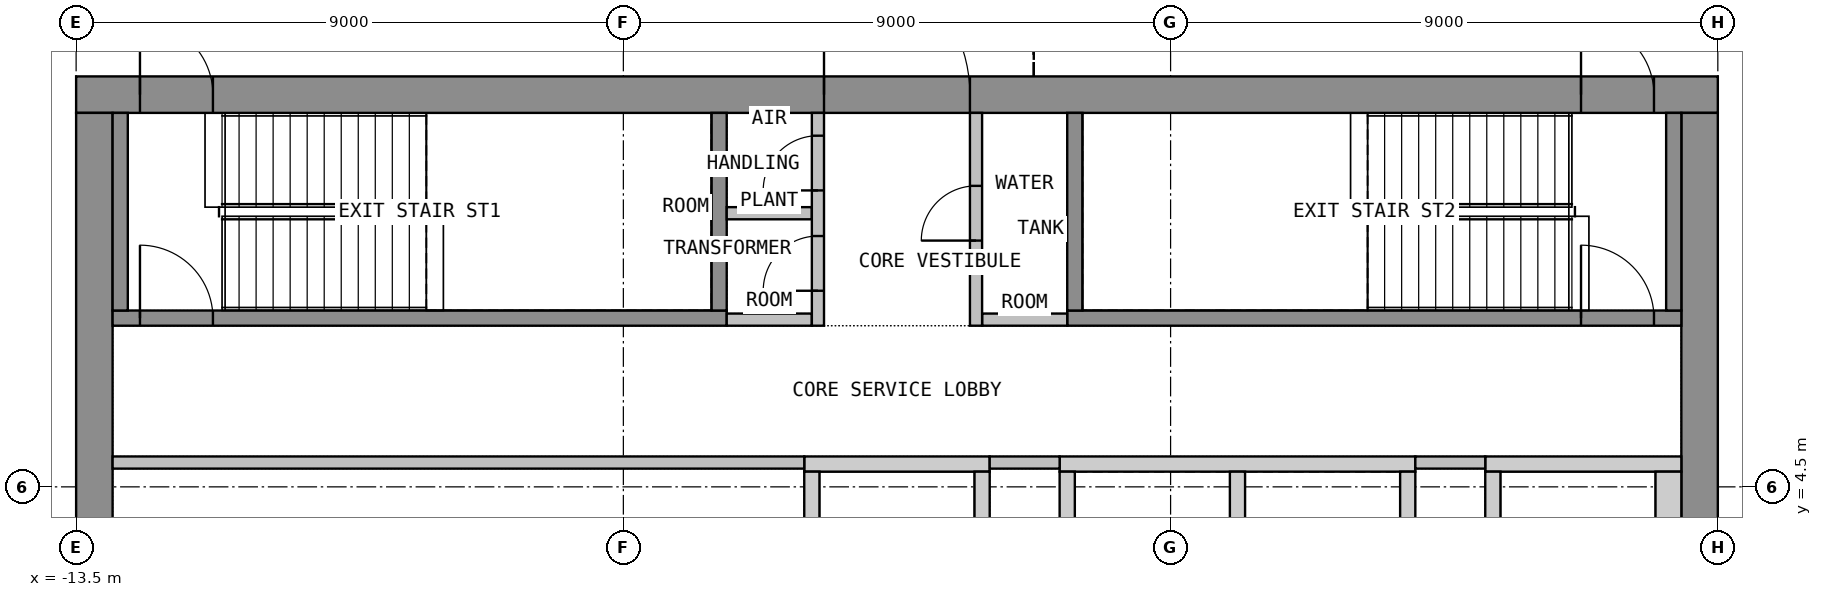
"""IFC4 building model, lengths in metres.
Left out: names, types, materials, properties, quantities, classifications, styles, units other than length and angle.
Written with IfcOpenShell. Run it as: python <this file> out.ifc"""

import sys

from ifc_helpers import new_model, si_unit, direction, frame, frame_2d, origin, place, context, subcontext, project, spatial, polyline, rectangle, outline, extrude, element, fill, save


model = new_model("IFC4")
c1 = context("Model", 3, precision=1e-05, world=origin(), true_north=direction((0.0, 1.0)))
c2 = subcontext(c1, "Body", "Model", "MODEL_VIEW")
j1 = project(units=[si_unit("LENGTHUNIT", "METRE"), si_unit("PLANEANGLEUNIT", "RADIAN")], contexts=[c1])
p1 = place(None, origin())
s1 = spatial("IfcSite", under=j1, at=p1, CompositionType="ELEMENT")
p2 = place(p1, origin())
s2 = spatial("IfcBuilding", under=s1, at=p2, CompositionType="ELEMENT")
p3 = place(p2, frame((0.0, 0.0, 230.7)))
s3 = spatial("IfcBuildingStorey", under=s2, at=p3, CompositionType="ELEMENT", Elevation=230.7)
p4 = place(p3, frame((-13.5, 10.95, 0.0), z_axis=(0.0, 0.0, 1.0), x_axis=(1.0, 0.0, 0.0)))
e1 = element("IfcWall", 1, at=p4, inside=s3, PredefinedType="SHEAR", context=c2, shape_type="SweptSolid", body=[
    extrude(rectangle(XDim=27.0, YDim=0.6, at=frame_2d((13.5, 0.0))), origin(), (0.0, 0.0, 1.0), 4.175),
])
p5 = place(p4, frame((12.3, 0.0, 0.0)))
e2 = element("IfcOpeningElement", 2, at=p5, cuts=e1, PredefinedType="OPENING", context=c2, shape_type="SweptSolid", body=[
    extrude(rectangle(XDim=2.4, YDim=2.1, at=frame_2d((1.2, 1.05))), frame((0.0, 0.31, 0.0), z_axis=(0.0, -1.0, 0.0), x_axis=(1.0, 0.0, 0.0)), (0.0, 0.0, 1.0), 0.62),
])
p6 = place(p4, frame((1.05, 0.0, 0.0)))
e3 = element("IfcOpeningElement", 3, at=p6, cuts=e1, PredefinedType="OPENING", context=c2, shape_type="SweptSolid", body=[
    extrude(rectangle(XDim=1.2, YDim=2.1, at=frame_2d((0.6, 1.05))), frame((0.0, 0.31, 0.0), z_axis=(0.0, -1.0, 0.0), x_axis=(1.0, 0.0, 0.0)), (0.0, 0.0, 1.0), 0.62),
])
p7 = place(p4, frame((24.75, 0.0, 0.0)))
e4 = element("IfcOpeningElement", 4, at=p7, cuts=e1, PredefinedType="OPENING", context=c2, shape_type="SweptSolid", body=[
    extrude(rectangle(XDim=1.2, YDim=2.1, at=frame_2d((0.6, 1.05))), frame((0.0, 0.31, 0.0), z_axis=(0.0, -1.0, 0.0), x_axis=(1.0, 0.0, 0.0)), (0.0, 0.0, 1.0), 0.62),
])
p8 = place(p3, frame((-13.2, -10.65, 0.0), z_axis=(0.0, 0.0, 1.0), x_axis=(0.0, 1.0, 0.0)))
e5 = element("IfcWall", 5, at=p8, inside=s3, PredefinedType="SHEAR", context=c2, shape_type="SweptSolid", body=[
    extrude(rectangle(XDim=21.3, YDim=0.6, at=frame_2d((10.65, 0.0))), origin(), (0.0, 0.0, 1.0), 4.175),
])
p9 = place(p8, frame((9.45, 0.0, 0.0)))
e6 = element("IfcOpeningElement", 6, at=p9, cuts=e5, PredefinedType="OPENING", context=c2, shape_type="SweptSolid", body=[
    extrude(rectangle(XDim=2.4, YDim=2.1, at=frame_2d((1.2, 1.05))), frame((0.0, 0.31, 0.0), z_axis=(0.0, -1.0, 0.0), x_axis=(1.0, 0.0, 0.0)), (0.0, 0.0, 1.0), 0.62),
])
p10 = place(p3, frame((13.2, -10.65, 0.0), z_axis=(0.0, 0.0, 1.0), x_axis=(0.0, 1.0, 0.0)))
e7 = element("IfcWall", 7, at=p10, inside=s3, PredefinedType="SHEAR", context=c2, shape_type="SweptSolid", body=[
    extrude(rectangle(XDim=21.3, YDim=0.6, at=frame_2d((10.65, 0.0))), origin(), (0.0, 0.0, 1.0), 4.175),
])
p11 = place(p10, frame((9.45, 0.0, 0.0)))
e8 = element("IfcOpeningElement", 8, at=p11, cuts=e7, PredefinedType="OPENING", context=c2, shape_type="SweptSolid", body=[
    extrude(rectangle(XDim=2.4, YDim=2.1, at=frame_2d((1.2, 1.05))), frame((0.0, 0.31, 0.0), z_axis=(0.0, -1.0, 0.0), x_axis=(1.0, 0.0, 0.0)), (0.0, 0.0, 1.0), 0.62),
])
p12 = place(p3, origin())
e9 = element("IfcWall", 9, at=p12, inside=s3, PredefinedType="SHEAR", context=c2, shape_type="SweptSolid", body=[
    extrude(outline(polyline([(-1.525, 4.75), (1.525, 4.75), (1.525, 5.0), (-1.525, 5.0), (-1.525, 4.75)])), origin(), (0.0, 0.0, 1.0), 4.175),
])
p13 = place(p3, origin())
e10 = element("IfcWall", 10, at=p13, inside=s3, PredefinedType="SHEAR", context=c2, shape_type="SweptSolid", body=[
    extrude(outline(polyline([(2.675, 4.75), (8.525, 4.75), (8.525, 5.0), (2.675, 5.0), (2.675, 4.75)])), origin(), (0.0, 0.0, 1.0), 4.175),
])
p14 = place(p3, origin())
e11 = element("IfcWall", 11, at=p14, inside=s3, PredefinedType="SHEAR", context=c2, shape_type="SweptSolid", body=[
    extrude(outline(polyline([(9.675, 4.75), (12.9, 4.75), (12.9, 5.0), (9.675, 5.0), (9.675, 4.75)])), origin(), (0.0, 0.0, 1.0), 4.175),
])
p15 = place(p3, origin())
e12 = element("IfcWall", 12, at=p15, inside=s3, PredefinedType="SHEAR", context=c2, shape_type="SweptSolid", body=[
    extrude(outline(polyline([(-1.525, 2.05), (-1.275, 2.05), (-1.275, 4.75), (-1.525, 4.75), (-1.525, 2.05)])), origin(), (0.0, 0.0, 1.0), 4.175),
])
p16 = place(p3, origin())
e13 = element("IfcWall", 13, at=p16, inside=s3, PredefinedType="SHEAR", context=c2, shape_type="SweptSolid", body=[
    extrude(outline(polyline([(1.275, 2.05), (1.525, 2.05), (1.525, 4.75), (1.275, 4.75), (1.275, 2.05)])), origin(), (0.0, 0.0, 1.0), 4.175),
])
p17 = place(p3, origin())
e14 = element("IfcWall", 14, at=p17, inside=s3, PredefinedType="SHEAR", context=c2, shape_type="SweptSolid", body=[
    extrude(outline(polyline([(2.675, 2.05), (2.925, 2.05), (2.925, 4.75), (2.675, 4.75), (2.675, 2.05)])), origin(), (0.0, 0.0, 1.0), 4.175),
])
p18 = place(p3, origin())
e15 = element("IfcWall", 15, at=p18, inside=s3, PredefinedType="SHEAR", context=c2, shape_type="SweptSolid", body=[
    extrude(outline(polyline([(5.475, 2.05), (5.725, 2.05), (5.725, 4.75), (5.475, 4.75), (5.475, 2.05)])), origin(), (0.0, 0.0, 1.0), 4.175),
])
p19 = place(p3, origin())
e16 = element("IfcWall", 16, at=p19, inside=s3, PredefinedType="SHEAR", context=c2, shape_type="SweptSolid", body=[
    extrude(outline(polyline([(8.275, 2.05), (8.525, 2.05), (8.525, 4.75), (8.275, 4.75), (8.275, 2.05)])), origin(), (0.0, 0.0, 1.0), 4.175),
])
p20 = place(p3, origin())
e17 = element("IfcWall", 17, at=p20, inside=s3, PredefinedType="SHEAR", context=c2, shape_type="SweptSolid", body=[
    extrude(outline(polyline([(9.675, 2.05), (9.925, 2.05), (9.925, 4.75), (9.675, 4.75), (9.675, 2.05)])), origin(), (0.0, 0.0, 1.0), 4.175),
])
p21 = place(p3, origin())
e18 = element("IfcWall", 18, at=p21, inside=s3, PredefinedType="SHEAR", context=c2, shape_type="SweptSolid", body=[
    extrude(outline(polyline([(12.475, 2.05), (12.9, 2.05), (12.9, 4.75), (12.475, 4.75), (12.475, 2.05)])), origin(), (0.0, 0.0, 1.0), 4.175),
])
p22 = place(p3, frame((-12.9, 7.275, 0.0), z_axis=(0.0, 0.0, 1.0), x_axis=(1.0, 0.0, 0.0)))
e19 = element("IfcWall", 19, at=p22, inside=s3, PredefinedType="SHEAR", context=c2, shape_type="SweptSolid", body=[
    extrude(rectangle(XDim=10.1, YDim=0.25, at=frame_2d((5.05, 0.0))), origin(), (0.0, 0.0, 1.0), 4.175),
])
p23 = place(p22, frame((0.45, 0.0, 0.0)))
e20 = element("IfcOpeningElement", 20, at=p23, cuts=e19, PredefinedType="OPENING", context=c2, shape_type="SweptSolid", body=[
    extrude(rectangle(XDim=1.2, YDim=2.1, at=frame_2d((0.6, 1.05))), frame((0.0, 0.135, 0.0), z_axis=(0.0, -1.0, 0.0), x_axis=(1.0, 0.0, 0.0)), (0.0, 0.0, 1.0), 0.27),
])
for number, where, z_axis, x_axis in (
    (21, (-12.775, 7.4, 0.0), (0.0, 0.0, 1.0), (0.0, 1.0, 0.0)),
    (22, (-2.925, 7.4, 0.0), (0.0, 0.0, 1.0), (0.0, 1.0, 0.0)),
):
    element("IfcWall", number, at=place(p3, frame(where, z_axis=z_axis, x_axis=x_axis)), inside=s3, PredefinedType="SHEAR", context=c2, shape_type="SweptSolid", body=[
        extrude(rectangle(XDim=3.25, YDim=0.25, at=frame_2d((1.625, 0.0))), origin(), (0.0, 0.0, 1.0), 4.175),
    ])
p24 = place(p3, frame((2.8, 7.275, 0.0), z_axis=(0.0, 0.0, 1.0), x_axis=(1.0, 0.0, 0.0)))
e23 = element("IfcWall", 23, at=p24, inside=s3, PredefinedType="SHEAR", context=c2, shape_type="SweptSolid", body=[
    extrude(rectangle(XDim=10.1, YDim=0.25, at=frame_2d((5.05, 0.0))), origin(), (0.0, 0.0, 1.0), 4.175),
])
p25 = place(p24, frame((8.45, 0.0, 0.0)))
e24 = element("IfcOpeningElement", 24, at=p25, cuts=e23, PredefinedType="OPENING", context=c2, shape_type="SweptSolid", body=[
    extrude(rectangle(XDim=1.2, YDim=2.1, at=frame_2d((0.6, 1.05))), frame((0.0, 0.135, 0.0), z_axis=(0.0, -1.0, 0.0), x_axis=(1.0, 0.0, 0.0)), (0.0, 0.0, 1.0), 0.27),
])
for number, where, z_axis, x_axis in (
    (25, (2.925, 7.4, 0.0), (0.0, 0.0, 1.0), (0.0, 1.0, 0.0)),
    (26, (12.775, 7.4, 0.0), (0.0, 0.0, 1.0), (0.0, 1.0, 0.0)),
):
    element("IfcWall", number, at=place(p3, frame(where, z_axis=z_axis, x_axis=x_axis)), inside=s3, PredefinedType="SHEAR", context=c2, shape_type="SweptSolid", body=[
        extrude(rectangle(XDim=3.25, YDim=0.25, at=frame_2d((1.625, 0.0))), origin(), (0.0, 0.0, 1.0), 4.175),
    ])
for number, where, z_axis, x_axis in (
    (27, (-2.8, 7.25, 0.0), (0.0, 0.0, 1.0), (1.0, 0.0, 0.0)),
    (28, (-2.8, 9.0, 0.0), (0.0, 0.0, 1.0), (1.0, 0.0, 0.0)),
    (29, (1.4, 7.25, 0.0), (0.0, 0.0, 1.0), (1.0, 0.0, 0.0)),
):
    element("IfcWall", number, at=place(p3, frame(where, z_axis=z_axis, x_axis=x_axis)), inside=s3, PredefinedType="PARTITIONING", context=c2, shape_type="SweptSolid", body=[
        extrude(rectangle(XDim=1.4, YDim=0.2, at=frame_2d((0.7, 0.0))), origin(), (0.0, 0.0, 1.0), 4.175),
    ])
p26 = place(p3, frame((-1.3, 7.15, 0.0), z_axis=(0.0, 0.0, 1.0), x_axis=(0.0, 1.0, 0.0)))
e30 = element("IfcWall", 30, at=p26, inside=s3, PredefinedType="PARTITIONING", context=c2, shape_type="SweptSolid", body=[
    extrude(rectangle(XDim=3.5, YDim=0.2, at=frame_2d((1.75, 0.0))), origin(), (0.0, 0.0, 1.0), 4.175),
])
p27 = place(p26, frame((0.575, 0.0, 0.0)))
e31 = element("IfcOpeningElement", 31, at=p27, cuts=e30, PredefinedType="OPENING", context=c2, shape_type="SweptSolid", body=[
    extrude(rectangle(XDim=0.9, YDim=2.1, at=frame_2d((0.45, 1.05))), frame((0.0, 0.11, 0.0), z_axis=(0.0, -1.0, 0.0), x_axis=(1.0, 0.0, 0.0)), (0.0, 0.0, 1.0), 0.22),
])
p28 = place(p26, frame((2.225, 0.0, 0.0)))
e32 = element("IfcOpeningElement", 32, at=p28, cuts=e30, PredefinedType="OPENING", context=c2, shape_type="SweptSolid", body=[
    extrude(rectangle(XDim=0.9, YDim=2.1, at=frame_2d((0.45, 1.05))), frame((0.0, 0.11, 0.0), z_axis=(0.0, -1.0, 0.0), x_axis=(1.0, 0.0, 0.0)), (0.0, 0.0, 1.0), 0.22),
])
p29 = place(p3, frame((1.3, 7.15, 0.0), z_axis=(0.0, 0.0, 1.0), x_axis=(0.0, 1.0, 0.0)))
e33 = element("IfcWall", 33, at=p29, inside=s3, PredefinedType="PARTITIONING", context=c2, shape_type="SweptSolid", body=[
    extrude(rectangle(XDim=3.5, YDim=0.2, at=frame_2d((1.75, 0.0))), origin(), (0.0, 0.0, 1.0), 4.175),
])
p30 = place(p29, frame((1.4, 0.0, 0.0)))
e34 = element("IfcOpeningElement", 34, at=p30, cuts=e33, PredefinedType="OPENING", context=c2, shape_type="SweptSolid", body=[
    extrude(rectangle(XDim=0.9, YDim=2.1, at=frame_2d((0.45, 1.05))), frame((0.0, 0.11, 0.0), z_axis=(0.0, -1.0, 0.0), x_axis=(1.0, 0.0, 0.0)), (0.0, 0.0, 1.0), 0.22),
])
p31 = place(p3, frame((-12.9, 4.9, 0.0), z_axis=(0.0, 0.0, 1.0), x_axis=(1.0, 0.0, 0.0)))
e35 = element("IfcWall", 35, at=p31, inside=s3, PredefinedType="PARTITIONING", context=c2, shape_type="SweptSolid", body=[
    extrude(rectangle(XDim=11.375, YDim=0.2, at=frame_2d((5.688, 0.0))), origin(), (0.0, 0.0, 1.0), 4.175),
])
for number, where, z_axis, x_axis in (
    (36, (1.525, 4.9, 0.0), (0.0, 0.0, 1.0), (1.0, 0.0, 0.0)),
    (37, (8.525, 4.9, 0.0), (0.0, 0.0, 1.0), (1.0, 0.0, 0.0)),
):
    element("IfcWall", number, at=place(p3, frame(where, z_axis=z_axis, x_axis=x_axis)), inside=s3, PredefinedType="PARTITIONING", context=c2, shape_type="SweptSolid", body=[
        extrude(rectangle(XDim=1.15, YDim=0.2, at=frame_2d((0.575, 0.0))), origin(), (0.0, 0.0, 1.0), 4.175),
    ])
p32 = place(p5, origin())
e38 = element("IfcDoor", 38, at=p32, inside=s3, OperationType="DOUBLE_DOOR_DOUBLE_SWING", PredefinedType="DOOR", context=c2, shape_type="SweptSolid", body=[
    extrude(rectangle(XDim=2.4, YDim=2.1, at=frame_2d((1.2, 1.05))), frame((0.0, 0.025, 0.0), z_axis=(0.0, -1.0, 0.0), x_axis=(1.0, 0.0, 0.0)), (0.0, 0.0, 1.0), 0.05),
])
fill(e2, e38)
p33 = place(p6, origin())
e39 = element("IfcDoor", 39, at=p33, inside=s3, OperationType="SINGLE_SWING_RIGHT", PredefinedType="DOOR", context=c2, shape_type="SweptSolid", body=[
    extrude(rectangle(XDim=1.2, YDim=2.1, at=frame_2d((0.6, 1.05))), frame((0.0, 0.025, 0.0), z_axis=(0.0, -1.0, 0.0), x_axis=(1.0, 0.0, 0.0)), (0.0, 0.0, 1.0), 0.05),
])
fill(e3, e39)
p34 = place(p7, origin())
e40 = element("IfcDoor", 40, at=p34, inside=s3, OperationType="SINGLE_SWING_RIGHT", PredefinedType="DOOR", context=c2, shape_type="SweptSolid", body=[
    extrude(rectangle(XDim=1.2, YDim=2.1, at=frame_2d((0.6, 1.05))), frame((0.0, 0.025, 0.0), z_axis=(0.0, -1.0, 0.0), x_axis=(1.0, 0.0, 0.0)), (0.0, 0.0, 1.0), 0.05),
])
fill(e4, e40)
p35 = place(p23, origin())
e41 = element("IfcDoor", 41, at=p35, inside=s3, OperationType="SINGLE_SWING_LEFT", PredefinedType="DOOR", context=c2, shape_type="SweptSolid", body=[
    extrude(rectangle(XDim=1.2, YDim=2.1, at=frame_2d((0.6, 1.05))), frame((0.0, 0.025, 0.0), z_axis=(0.0, -1.0, 0.0), x_axis=(1.0, 0.0, 0.0)), (0.0, 0.0, 1.0), 0.05),
])
fill(e20, e41)
p36 = place(p25, origin())
e42 = element("IfcDoor", 42, at=p36, inside=s3, OperationType="SINGLE_SWING_LEFT", PredefinedType="DOOR", context=c2, shape_type="SweptSolid", body=[
    extrude(rectangle(XDim=1.2, YDim=2.1, at=frame_2d((0.6, 1.05))), frame((0.0, 0.025, 0.0), z_axis=(0.0, -1.0, 0.0), x_axis=(1.0, 0.0, 0.0)), (0.0, 0.0, 1.0), 0.05),
])
fill(e24, e42)
p37 = place(p27, origin())
e43 = element("IfcDoor", 43, at=p37, inside=s3, OperationType="SINGLE_SWING_LEFT", PredefinedType="DOOR", context=c2, shape_type="SweptSolid", body=[
    extrude(rectangle(XDim=0.9, YDim=2.1, at=frame_2d((0.45, 1.05))), frame((0.0, 0.025, 0.0), z_axis=(0.0, -1.0, 0.0), x_axis=(1.0, 0.0, 0.0)), (0.0, 0.0, 1.0), 0.05),
])
fill(e31, e43)
p38 = place(p28, origin())
e44 = element("IfcDoor", 44, at=p38, inside=s3, OperationType="SINGLE_SWING_LEFT", PredefinedType="DOOR", context=c2, shape_type="SweptSolid", body=[
    extrude(rectangle(XDim=0.9, YDim=2.1, at=frame_2d((0.45, 1.05))), frame((0.0, 0.025, 0.0), z_axis=(0.0, -1.0, 0.0), x_axis=(1.0, 0.0, 0.0)), (0.0, 0.0, 1.0), 0.05),
])
fill(e32, e44)
p39 = place(p30, origin())
e45 = element("IfcDoor", 45, at=p39, inside=s3, OperationType="SINGLE_SWING_LEFT", PredefinedType="DOOR", context=c2, shape_type="SweptSolid", body=[
    extrude(rectangle(XDim=0.9, YDim=2.1, at=frame_2d((0.45, 1.05))), frame((0.0, 0.025, 0.0), z_axis=(0.0, -1.0, 0.0), x_axis=(1.0, 0.0, 0.0)), (0.0, 0.0, 1.0), 0.05),
])
fill(e34, e45)
save(model, sys.argv[1])
